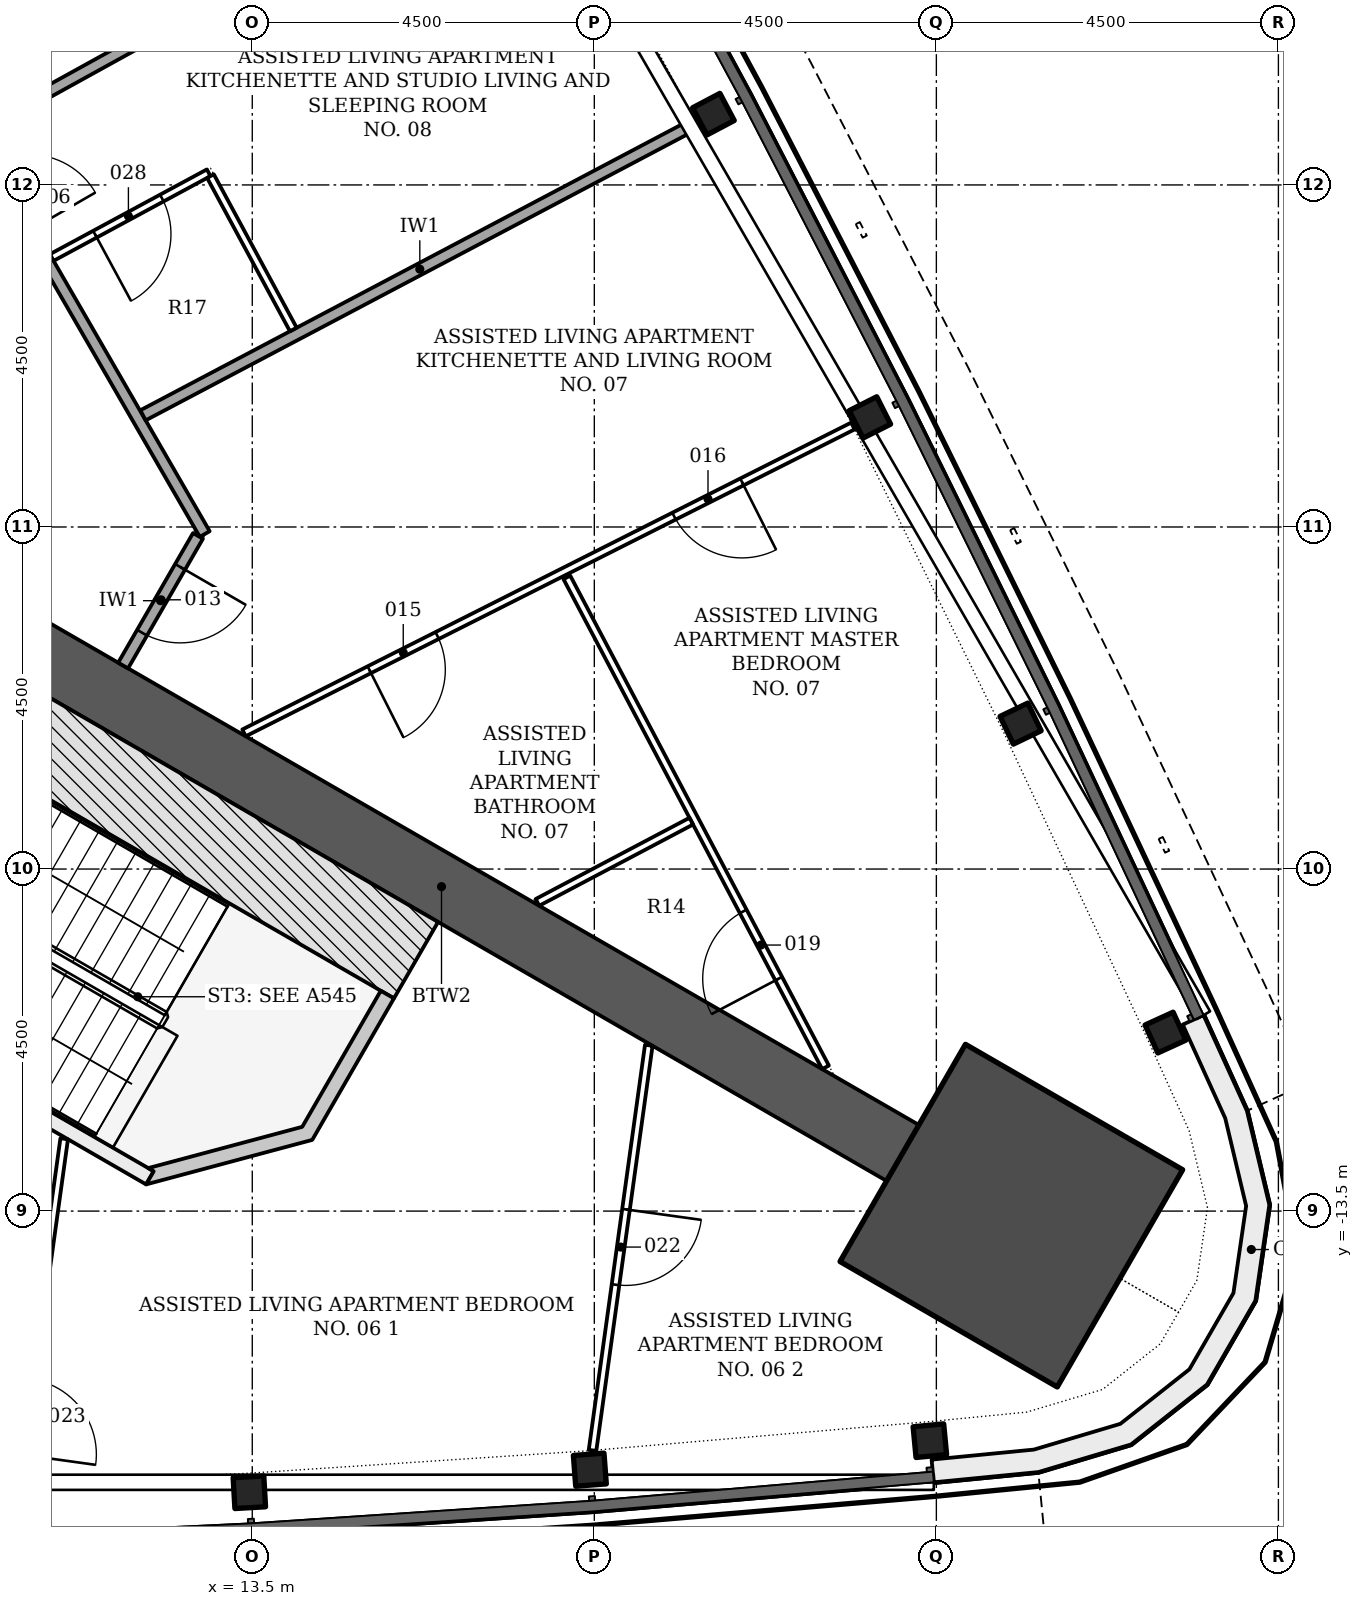
"""IFC4 building model, lengths in metres.
Left out: names, types, materials, properties, quantities, classifications, styles, units other than length and angle.
Written with IfcOpenShell. Run it as: python <this file> out.ifc"""

import sys

from ifc_helpers import new_model, si_unit, direction, frame, frame_2d, origin, origin_2d, place, context, subcontext, project, spatial, polyline, rectangle, i_section, outline, extrude, element, fill, save


model = new_model("IFC4")
c1 = context("Model", 3, precision=1e-05, world=origin(), true_north=direction((0.0, 1.0)))
c2 = subcontext(c1, "Body", "Model", "MODEL_VIEW")
j1 = project(units=[si_unit("LENGTHUNIT", "METRE"), si_unit("PLANEANGLEUNIT", "RADIAN")], contexts=[c1])
p1 = place(None, origin())
s1 = spatial("IfcSite", under=j1, at=p1, CompositionType="ELEMENT")
p2 = place(p1, origin())
s2 = spatial("IfcBuilding", under=s1, at=p2, CompositionType="ELEMENT")
p3 = place(p2, frame((0.0, 0.0, 45.6)))
s3 = spatial("IfcBuildingStorey", under=s2, at=p3, CompositionType="ELEMENT", Elevation=45.6)
p4 = place(p3, frame((9.922, -5.728, -0.2), z_axis=(0.0, 0.0, 1.0), x_axis=(0.866021666006, -0.500006473966, 0.0)))
e1 = element("IfcWall", 1, at=p4, inside=s3, PredefinedType="SHEAR", context=c2, shape_type="SweptSolid", body=[
    extrude(rectangle(XDim=14.013, YDim=0.85, at=frame_2d((7.007, 0.0))), origin(), (0.0, 0.0, 1.0), 3.6),
])
p5 = place(p3, frame((23.487, -13.56, -0.2), z_axis=(0.0, 0.0, 1.0), x_axis=(0.866025403784, -0.5, 0.0)))
e2 = element("IfcColumn", 2, at=p5, inside=s3, PredefinedType="COLUMN", context=c2, shape_type="SweptSolid", body=[
    extrude(rectangle(XDim=3.3, YDim=3.3, at=origin_2d()), origin(), (0.0, 0.0, 1.0), 3.6),
])
for number, where, z_axis, x_axis in (
    (3, (13.462, -17.199, -0.2), (0.0, 0.0, 1.0), (0.998, 0.057, 0.0)),
    (4, (17.941, -16.902, -0.2), (0.0, 0.0, 1.0), (0.997, 0.076, 0.0)),
    (5, (22.415, -16.521, -0.2), (0.0, 0.0, 1.0), (0.996, 0.094, 0.0)),
    (6, (25.514, -11.151, -0.2), (0.0, 0.0, 1.0), (-0.416, 0.909, 0.0)),
    (7, (23.608, -7.086, -0.2), (0.0, 0.0, 1.0), (-0.433, 0.901, 0.0)),
    (8, (21.626, -3.059, -0.2), (0.0, 0.0, 1.0), (-0.45, 0.893, 0.0)),
    (9, (19.567, 0.931, -0.2), (0.0, 0.0, 1.0), (-0.467, 0.884, 0.0)),
):
    element("IfcColumn", number, at=place(p3, frame(where, z_axis=z_axis, x_axis=x_axis)), inside=s3, PredefinedType="COLUMN", context=c2, shape_type="SweptSolid", body=[
        extrude(i_section(OverallWidth=0.404, OverallDepth=0.406, WebThickness=0.027, FlangeThickness=0.044, FilletRadius=0.015, at=origin_2d()), origin(), (0.0, 0.0, 1.0), 3.6),
    ])
p6 = place(p3, origin())
e10 = element("IfcWall", 10, at=p6, inside=s3, PredefinedType="NOTDEFINED", context=c2, shape_type="SweptSolid", body=[
    extrude(outline(polyline([(22.467, -17.068), (23.842, -16.933), (25.062, -16.57), (26.061, -15.781), (26.697, -14.679), (26.881, -13.419), (26.586, -12.181), (26.014, -10.923), (25.741, -11.047), (26.301, -12.279), (26.575, -13.433), (26.408, -14.578), (25.829, -15.581), (24.921, -16.299), (23.784, -16.638), (22.437, -16.769), (22.467, -17.068)])), origin(), (0.0, 0.0, 1.0), 3.3),
])
p7 = place(p3, frame((7.304, -10.262, -0.2), z_axis=(0.0, 0.0, 1.0), x_axis=(0.866026594901, -0.49999793692, 0.0)))
e11 = element("IfcWall", 11, at=p7, inside=s3, PredefinedType="SHEAR", context=c2, shape_type="SweptSolid", body=[
    extrude(rectangle(XDim=5.6, YDim=0.2, at=frame_2d((2.8, 0.0))), origin(), (0.0, 0.0, 1.0), 3.6),
])
p8 = place(p7, frame((0.45, 0.0, 0.2)))
e12 = element("IfcOpeningElement", 12, at=p8, cuts=e11, PredefinedType="OPENING", context=c2, shape_type="SweptSolid", body=[
    extrude(rectangle(XDim=1.2, YDim=2.1, at=frame_2d((0.6, 1.05))), frame((0.0, 0.11, 0.0), z_axis=(0.0, -1.0, 0.0), x_axis=(1.0, 0.0, 0.0)), (0.0, 0.0, 1.0), 0.22),
])
p9 = place(p3, frame((9.419, -6.599, -0.2), z_axis=(0.0, 0.0, 1.0), x_axis=(0.866033125095, -0.499986626058, 0.0)))
e13 = element("IfcWall", 13, at=p9, inside=s3, PredefinedType="SHEAR", context=c2, shape_type="SweptSolid", body=[
    extrude(rectangle(XDim=7.2, YDim=1.161, at=frame_2d((3.6, 0.0))), origin(), (0.0, 0.0, 1.0), 3.6),
])
p10 = place(p3, frame((0.0, 0.0, -0.2)))
e14 = element("IfcWall", 14, at=p10, inside=s3, PredefinedType="SHEAR", context=c2, shape_type="SweptSolid", body=[
    extrude(outline(polyline([(12.104, -13.149), (14.289, -12.563), (15.364, -10.701), (15.191, -10.601), (14.157, -12.392), (12.132, -12.934), (12.204, -12.976), (12.204, -12.976), (12.204, -12.976), (12.204, -12.976), (12.204, -12.976), (12.204, -12.976), (12.204, -12.976), (12.204, -12.976), (12.204, -12.976), (12.204, -12.976), (12.204, -12.976), (12.204, -12.976), (12.204, -12.976), (12.204, -12.976), (12.204, -12.976), (12.204, -12.976), (12.204, -12.976), (12.104, -13.149)])), origin(), (0.0, 0.0, 1.0), 3.6),
])
p11 = place(p3, frame((5.346, 8.446, 0.0), z_axis=(0.0, 0.0, 1.0), x_axis=(0.500008781656, -0.866020333634, 0.0)))
e15 = element("IfcWall", 15, at=p11, inside=s3, PredefinedType="PARTITIONING", context=c2, shape_type="SweptSolid", body=[
    extrude(rectangle(XDim=15.057, YDim=0.15, at=frame_2d((7.528, 0.0))), origin(), (0.0, 0.0, 1.0), 2.778),
])
p12 = place(p11, frame((9.446, 0.0, 0.0)))
e16 = element("IfcOpeningElement", 16, at=p12, cuts=e15, PredefinedType="OPENING", context=c2, shape_type="SweptSolid", body=[
    extrude(rectangle(XDim=1.0, YDim=2.1, at=frame_2d((0.5, 1.05))), frame((0.0, 0.085, 0.0), z_axis=(0.0, -1.0, 0.0), x_axis=(1.0, 0.0, 0.0)), (0.0, 0.0, 1.0), 0.17),
])
p13 = place(p11, frame((1.892, 0.0, 0.0)))
e17 = element("IfcOpeningElement", 17, at=p13, cuts=e15, PredefinedType="OPENING", context=c2, shape_type="SweptSolid", body=[
    extrude(rectangle(XDim=1.0, YDim=2.1, at=frame_2d((0.5, 1.05))), frame((0.0, 0.085, 0.0), z_axis=(0.0, -1.0, 0.0), x_axis=(1.0, 0.0, 0.0)), (0.0, 0.0, 1.0), 0.17),
])
p14 = place(p3, frame((12.786, -4.617, 0.0), z_axis=(0.0, 0.0, 1.0), x_axis=(-0.500058665202, -0.865991530765, 0.0)))
e18 = element("IfcWall", 18, at=p14, inside=s3, PredefinedType="PARTITIONING", context=c2, shape_type="SweptSolid", body=[
    extrude(rectangle(XDim=1.969, YDim=0.15, at=frame_2d((0.985, 0.0))), origin(), (0.0, 0.0, 1.0), 3.4),
])
p15 = place(p14, frame((0.471, 0.0, 0.0)))
e19 = element("IfcOpeningElement", 19, at=p15, cuts=e18, PredefinedType="OPENING", context=c2, shape_type="SweptSolid", body=[
    extrude(rectangle(XDim=1.0, YDim=2.1, at=frame_2d((0.5, 1.05))), frame((0.0, 0.085, 0.0), z_axis=(0.0, -1.0, 0.0), x_axis=(1.0, 0.0, 0.0)), (0.0, 0.0, 1.0), 0.17),
])
p16 = place(p3, frame((17.215, 4.76, 0.0), z_axis=(0.0, 0.0, 1.0), x_axis=(-0.875336511681, -0.483514210048, 0.0)))
e20 = element("IfcWall", 20, at=p16, inside=s3, PredefinedType="PARTITIONING", context=c2, shape_type="SweptSolid", body=[
    extrude(rectangle(XDim=8.361, YDim=0.15, at=frame_2d((4.18, 0.0))), origin(), (0.0, 0.0, 1.0), 2.778),
])
p17 = place(p3, frame((19.346, 0.815, 0.0), z_axis=(0.0, 0.0, 1.0), x_axis=(-0.884307928431, -0.466904152599, 0.0)))
e21 = element("IfcWall", 21, at=p17, inside=s3, PredefinedType="PARTITIONING", context=c2, shape_type="SweptSolid", body=[
    extrude(rectangle(XDim=8.237, YDim=0.15, at=frame_2d((4.118, 0.0))), origin(), (0.0, 0.0, 1.0), 2.778),
])
p18 = place(p3, frame((21.402, -3.171, 0.0), z_axis=(0.0, 0.0, 1.0), x_axis=(-0.892974760713, -0.450106739263, 0.0)))
e22 = element("IfcWall", 22, at=p18, inside=s3, PredefinedType="PARTITIONING", context=c2, shape_type="SweptSolid", body=[
    extrude(rectangle(XDim=8.971, YDim=0.1, at=frame_2d((4.486, 0.0))), origin(), (0.0, 0.0, 1.0), 2.847),
])
p19 = place(p18, frame((6.125, 0.0, 0.0)))
e23 = element("IfcOpeningElement", 23, at=p19, cuts=e22, PredefinedType="OPENING", context=c2, shape_type="SweptSolid", body=[
    extrude(rectangle(XDim=1.0, YDim=2.1, at=frame_2d((0.5, 1.05))), frame((0.0, 0.06, 0.0), z_axis=(0.0, -1.0, 0.0), x_axis=(1.0, 0.0, 0.0)), (0.0, 0.0, 1.0), 0.12),
])
p20 = place(p18, frame((1.635, 0.0, 0.0)))
e24 = element("IfcOpeningElement", 24, at=p20, cuts=e22, PredefinedType="OPENING", context=c2, shape_type="SweptSolid", body=[
    extrude(rectangle(XDim=1.0, YDim=2.1, at=frame_2d((0.5, 1.05))), frame((0.0, 0.06, 0.0), z_axis=(0.0, -1.0, 0.0), x_axis=(1.0, 0.0, 0.0)), (0.0, 0.0, 1.0), 0.12),
])
p21 = place(p3, frame((21.042, -11.609, 0.0), z_axis=(0.0, 0.0, 1.0), x_axis=(-0.466893242862, 0.884313688557, 0.0)))
e25 = element("IfcWall", 25, at=p21, inside=s3, PredefinedType="PARTITIONING", context=c2, shape_type="SweptSolid", body=[
    extrude(rectangle(XDim=7.289, YDim=0.1, at=frame_2d((3.645, 0.0))), origin(), (0.0, 0.0, 1.0), 2.847),
])
p22 = place(p21, frame((1.319, 0.0, 0.0)))
e26 = element("IfcOpeningElement", 26, at=p22, cuts=e25, PredefinedType="OPENING", context=c2, shape_type="SweptSolid", body=[
    extrude(rectangle(XDim=1.0, YDim=2.1, at=frame_2d((0.5, 1.05))), frame((0.0, 0.06, 0.0), z_axis=(0.0, -1.0, 0.0), x_axis=(1.0, 0.0, 0.0)), (0.0, 0.0, 1.0), 0.12),
])
p23 = place(p3, frame((18.717, -11.319, 0.0), z_axis=(0.0, 0.0, 1.0), x_axis=(-0.13752632962, -0.990498111387, 0.0)))
e27 = element("IfcWall", 27, at=p23, inside=s3, PredefinedType="PARTITIONING", context=c2, shape_type="SweptSolid", body=[
    extrude(rectangle(XDim=5.381, YDim=0.1, at=frame_2d((2.69, 0.0))), origin(), (0.0, 0.0, 1.0), 2.923),
])
p24 = place(p23, frame((2.18, 0.0, 0.0)))
e28 = element("IfcOpeningElement", 28, at=p24, cuts=e27, PredefinedType="OPENING", context=c2, shape_type="SweptSolid", body=[
    extrude(rectangle(XDim=1.0, YDim=2.1, at=frame_2d((0.5, 1.05))), frame((0.0, 0.06, 0.0), z_axis=(0.0, -1.0, 0.0), x_axis=(1.0, 0.0, 0.0)), (0.0, 0.0, 1.0), 0.12),
])
p25 = place(p3, frame((11.026, -12.548, 0.0), z_axis=(0.0, 0.0, 1.0), x_axis=(-0.137526474089, -0.990498091328, 0.0)))
e29 = element("IfcWall", 29, at=p25, inside=s3, PredefinedType="PARTITIONING", context=c2, shape_type="SweptSolid", body=[
    extrude(rectangle(XDim=5.24, YDim=0.1, at=frame_2d((2.62, 0.0))), origin(), (0.0, 0.0, 1.0), 2.974),
])
p26 = place(p25, frame((3.192, 0.0, 0.0)))
e30 = element("IfcOpeningElement", 30, at=p26, cuts=e29, PredefinedType="OPENING", context=c2, shape_type="SweptSolid", body=[
    extrude(rectangle(XDim=1.0, YDim=2.1, at=frame_2d((0.5, 1.05))), frame((0.0, 0.06, 0.0), z_axis=(0.0, -1.0, 0.0), x_axis=(1.0, 0.0, 0.0)), (0.0, 0.0, 1.0), 0.12),
])
p27 = place(p3, frame((19.275, -8.37, 0.0), z_axis=(0.0, 0.0, 1.0), x_axis=(-0.884285648232, -0.466946348451, 0.0)))
e31 = element("IfcWall", 31, at=p27, inside=s3, PredefinedType="PARTITIONING", context=c2, shape_type="SweptSolid", body=[
    extrude(rectangle(XDim=2.289, YDim=0.1, at=frame_2d((1.144, 0.0))), origin(), (0.0, 0.0, 1.0), 3.4),
])
p28 = place(p3, frame((12.926, 0.16, 0.0), z_axis=(0.0, 0.0, 1.0), x_axis=(-0.879868843932, -0.475216600591, 0.0)))
e32 = element("IfcWall", 32, at=p28, inside=s3, PredefinedType="PARTITIONING", context=c2, shape_type="SweptSolid", body=[
    extrude(rectangle(XDim=2.346, YDim=0.1, at=frame_2d((1.173, 0.0))), origin(), (0.0, 0.0, 1.0), 3.4),
])
p29 = place(p28, frame((0.7, 0.0, 0.0)))
e33 = element("IfcOpeningElement", 33, at=p29, cuts=e32, PredefinedType="OPENING", context=c2, shape_type="SweptSolid", body=[
    extrude(rectangle(XDim=1.0, YDim=2.1, at=frame_2d((0.5, 1.05))), frame((0.0, 0.06, 0.0), z_axis=(0.0, -1.0, 0.0), x_axis=(1.0, 0.0, 0.0)), (0.0, 0.0, 1.0), 0.12),
])
p30 = place(p3, frame((14.04, -1.902, 0.0), z_axis=(0.0, 0.0, 1.0), x_axis=(-0.475140672056, 0.879909848654, 0.0)))
e34 = element("IfcWall", 34, at=p30, inside=s3, PredefinedType="PARTITIONING", context=c2, shape_type="SweptSolid", body=[
    extrude(rectangle(XDim=2.293, YDim=0.1, at=frame_2d((1.146, 0.0))), origin(), (0.0, 0.0, 1.0), 2.778),
])
p31 = place(p15, origin())
e35 = element("IfcDoor", 35, at=p31, inside=s3, OperationType="SINGLE_SWING_LEFT", PredefinedType="DOOR", context=c2, shape_type="SweptSolid", body=[
    extrude(rectangle(XDim=1.0, YDim=2.1, at=frame_2d((0.5, 1.05))), frame((0.0, 0.025, 0.0), z_axis=(0.0, -1.0, 0.0), x_axis=(1.0, 0.0, 0.0)), (0.0, 0.0, 1.0), 0.05),
])
fill(e19, e35)
p32 = place(p19, origin())
e36 = element("IfcDoor", 36, at=p32, inside=s3, OperationType="SINGLE_SWING_RIGHT", PredefinedType="DOOR", context=c2, shape_type="SweptSolid", body=[
    extrude(rectangle(XDim=1.0, YDim=2.1, at=frame_2d((0.5, 1.05))), frame((0.0, 0.025, 0.0), z_axis=(0.0, -1.0, 0.0), x_axis=(1.0, 0.0, 0.0)), (0.0, 0.0, 1.0), 0.05),
])
fill(e23, e36)
p33 = place(p20, origin())
e37 = element("IfcDoor", 37, at=p33, inside=s3, OperationType="SINGLE_SWING_LEFT", PredefinedType="DOOR", context=c2, shape_type="SweptSolid", body=[
    extrude(rectangle(XDim=1.0, YDim=2.1, at=frame_2d((0.5, 1.05))), frame((0.0, 0.025, 0.0), z_axis=(0.0, -1.0, 0.0), x_axis=(1.0, 0.0, 0.0)), (0.0, 0.0, 1.0), 0.05),
])
fill(e24, e37)
p34 = place(p22, origin())
e38 = element("IfcDoor", 38, at=p34, inside=s3, OperationType="SINGLE_SWING_LEFT", PredefinedType="DOOR", context=c2, shape_type="SweptSolid", body=[
    extrude(rectangle(XDim=1.0, YDim=2.1, at=frame_2d((0.5, 1.05))), frame((0.0, 0.025, 0.0), z_axis=(0.0, -1.0, 0.0), x_axis=(1.0, 0.0, 0.0)), (0.0, 0.0, 1.0), 0.05),
])
fill(e26, e38)
p35 = place(p24, origin())
e39 = element("IfcDoor", 39, at=p35, inside=s3, OperationType="SINGLE_SWING_LEFT", PredefinedType="DOOR", context=c2, shape_type="SweptSolid", body=[
    extrude(rectangle(XDim=1.0, YDim=2.1, at=frame_2d((0.5, 1.05))), frame((0.0, 0.025, 0.0), z_axis=(0.0, -1.0, 0.0), x_axis=(1.0, 0.0, 0.0)), (0.0, 0.0, 1.0), 0.05),
])
fill(e28, e39)
p36 = place(p29, origin())
e40 = element("IfcDoor", 40, at=p36, inside=s3, OperationType="SINGLE_SWING_RIGHT", PredefinedType="DOOR", context=c2, shape_type="SweptSolid", body=[
    extrude(rectangle(XDim=1.0, YDim=2.1, at=frame_2d((0.5, 1.05))), frame((0.0, 0.025, 0.0), z_axis=(0.0, -1.0, 0.0), x_axis=(1.0, 0.0, 0.0)), (0.0, 0.0, 1.0), 0.05),
])
fill(e33, e40)
save(model, sys.argv[1])
